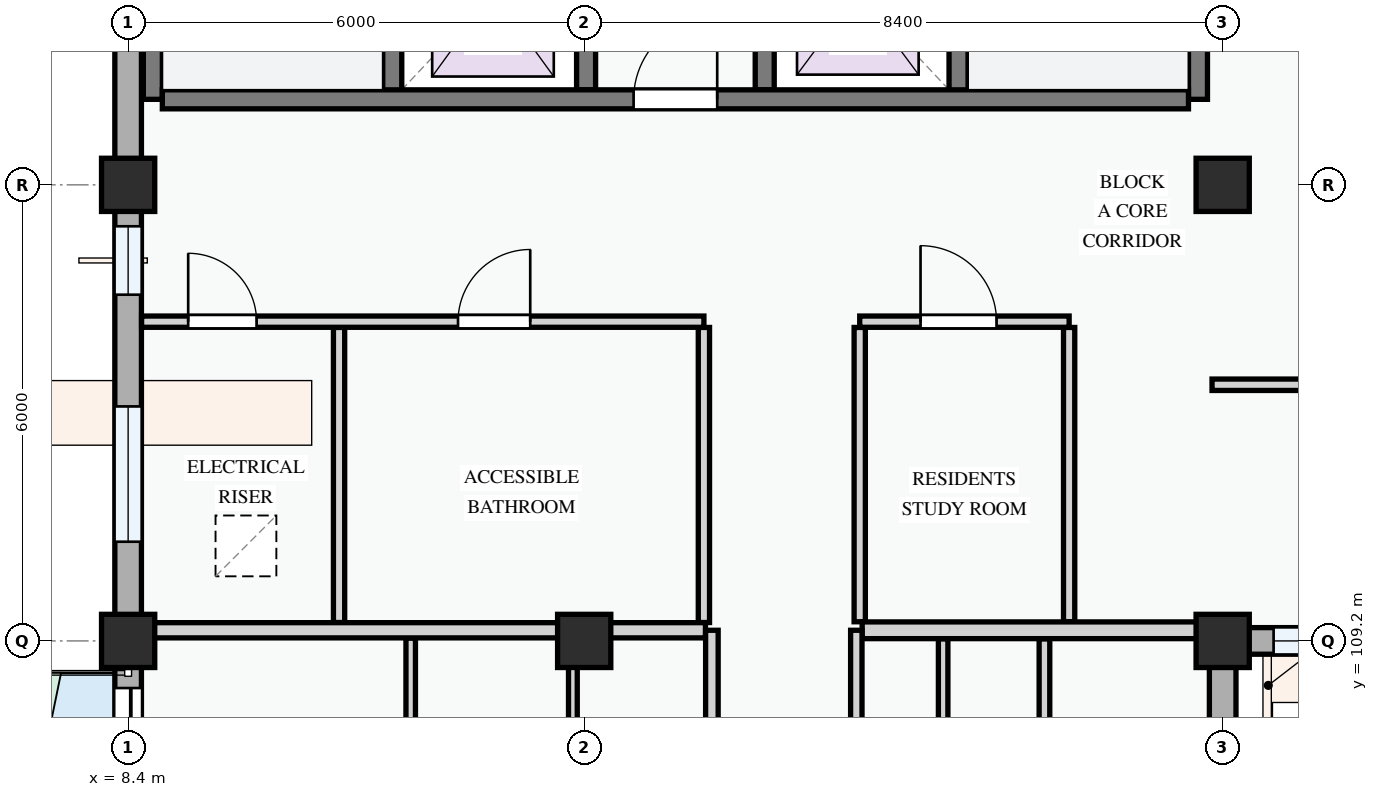
"""IFC4 building model, lengths in metres.
Left out: names, types, materials, properties, quantities, classifications, styles, units other than length and angle.
Written with IfcOpenShell. Run it as: python <this file> out.ifc"""

import sys

from ifc_helpers import new_model, si_unit, direction, frame, frame_2d, origin, origin_2d, place, context, subcontext, project, spatial, rectangle, extrude, element, fill, save


model = new_model("IFC4")
c1 = context("Model", 3, precision=1e-05, world=origin(), true_north=direction((0.0, 1.0)))
c2 = subcontext(c1, "Body", "Model", "MODEL_VIEW")
j1 = project(units=[si_unit("LENGTHUNIT", "METRE"), si_unit("PLANEANGLEUNIT", "RADIAN")], contexts=[c1])
p1 = place(None, origin())
s1 = spatial("IfcSite", under=j1, at=p1, CompositionType="ELEMENT")
p2 = place(p1, origin())
s2 = spatial("IfcBuilding", under=s1, at=p2, CompositionType="ELEMENT")
p3 = place(p2, frame((0.0, 0.0, 14.7)))
s3 = spatial("IfcBuildingStorey", under=s2, at=p3, CompositionType="ELEMENT", Elevation=14.7)
for number, where, z_axis, x_axis in (
    (1, (8.4, 109.2, 0.0), (0.0, 0.0, 1.0), (1.0, 0.0, 0.0)),
    (2, (8.4, 115.2, 0.0), (0.0, 0.0, 1.0), (1.0, 0.0, 0.0)),
    (3, (14.4, 109.2, 0.0), (0.0, 0.0, 1.0), (1.0, 0.0, 0.0)),
    (4, (22.8, 109.2, 0.0), (0.0, 0.0, 1.0), (1.0, 0.0, 0.0)),
    (5, (22.8, 115.2, 0.0), (0.0, 0.0, 1.0), (1.0, 0.0, 0.0)),
):
    element("IfcColumn", number, at=place(p3, frame(where, z_axis=z_axis, x_axis=x_axis)), inside=s3, PredefinedType="COLUMN", context=c2, shape_type="SweptSolid", body=[
        extrude(rectangle(XDim=0.7, YDim=0.7, at=origin_2d()), origin(), (0.0, 0.0, 1.0), 3.3),
    ])
p4 = place(p3, frame((22.8, 109.2, 0.0), z_axis=(0.0, 0.0, 1.0), x_axis=(1.0, 0.0, 0.0)))
e6 = element("IfcWall", 6, at=p4, inside=s3, PredefinedType="STANDARD", context=c2, shape_type="SweptSolid", body=[
    extrude(rectangle(XDim=6.0, YDim=0.35, at=frame_2d((3.0, 0.0))), origin(), (0.0, 0.0, 1.0), 2.475),
])
p5 = place(p4, frame((0.67, 0.0, 0.78)))
e7 = element("IfcOpeningElement", 7, at=p5, cuts=e6, PredefinedType="OPENING", context=c2, shape_type="SweptSolid", body=[
    extrude(rectangle(XDim=1.2, YDim=1.35, at=frame_2d((0.6, 0.675))), frame((0.0, 0.185, 0.0), z_axis=(0.0, -1.0, 0.0), x_axis=(1.0, 0.0, 0.0)), (0.0, 0.0, 1.0), 0.37),
])
p6 = place(p4, frame((2.905, 0.0, 0.78)))
e8 = element("IfcOpeningElement", 8, at=p6, cuts=e6, PredefinedType="OPENING", context=c2, shape_type="SweptSolid", body=[
    extrude(rectangle(XDim=2.35, YDim=1.55, at=frame_2d((1.175, 0.775))), frame((0.0, 0.185, 0.0), z_axis=(0.0, -1.0, 0.0), x_axis=(1.0, 0.0, 0.0)), (0.0, 0.0, 1.0), 0.37),
])
p7 = place(p3, frame((8.4, 123.6, 0.0), z_axis=(0.0, 0.0, 1.0), x_axis=(0.0, -1.0, 0.0)))
e9 = element("IfcWall", 9, at=p7, inside=s3, PredefinedType="STANDARD", context=c2, shape_type="SweptSolid", body=[
    extrude(rectangle(XDim=8.4, YDim=0.35, at=frame_2d((4.2, 0.0))), origin(), (0.0, 0.0, 1.0), 2.345),
])
p8 = place(p7, frame((1.446, 0.0, 0.78)))
e10 = element("IfcOpeningElement", 10, at=p8, cuts=e9, PredefinedType="OPENING", context=c2, shape_type="SweptSolid", body=[
    extrude(rectangle(XDim=1.1, YDim=1.3, at=frame_2d((0.55, 0.65))), frame((0.0, 0.185, 0.0), z_axis=(0.0, -1.0, 0.0), x_axis=(1.0, 0.0, 0.0)), (0.0, 0.0, 1.0), 0.37),
])
p9 = place(p7, frame((4.944, 0.0, 0.78)))
e11 = element("IfcOpeningElement", 11, at=p9, cuts=e9, PredefinedType="OPENING", context=c2, shape_type="SweptSolid", body=[
    extrude(rectangle(XDim=1.05, YDim=1.2, at=frame_2d((0.525, 0.6))), frame((0.0, 0.185, 0.0), z_axis=(0.0, -1.0, 0.0), x_axis=(1.0, 0.0, 0.0)), (0.0, 0.0, 1.0), 0.37),
])
p10 = place(p3, frame((8.4, 115.2, 0.0), z_axis=(0.0, 0.0, 1.0), x_axis=(0.0, -1.0, 0.0)))
e12 = element("IfcWall", 12, at=p10, inside=s3, PredefinedType="STANDARD", context=c2, shape_type="SweptSolid", body=[
    extrude(rectangle(XDim=6.0, YDim=0.35, at=frame_2d((3.0, 0.0))), origin(), (0.0, 0.0, 1.0), 2.445),
])
p11 = place(p10, frame((0.545, 0.0, 0.78)))
e13 = element("IfcOpeningElement", 13, at=p11, cuts=e12, PredefinedType="OPENING", context=c2, shape_type="SweptSolid", body=[
    extrude(rectangle(XDim=0.9, YDim=1.2, at=frame_2d((0.45, 0.6))), frame((0.0, 0.185, 0.0), z_axis=(0.0, -1.0, 0.0), x_axis=(1.0, 0.0, 0.0)), (0.0, 0.0, 1.0), 0.37),
])
p12 = place(p10, frame((2.915, 0.0, 0.78)))
e14 = element("IfcOpeningElement", 14, at=p12, cuts=e12, PredefinedType="OPENING", context=c2, shape_type="SweptSolid", body=[
    extrude(rectangle(XDim=1.78, YDim=1.42, at=frame_2d((0.89, 0.71))), frame((0.0, 0.185, 0.0), z_axis=(0.0, -1.0, 0.0), x_axis=(1.0, 0.0, 0.0)), (0.0, 0.0, 1.0), 0.37),
])
p13 = place(p3, frame((8.4, 109.2, 0.0), z_axis=(0.0, 0.0, 1.0), x_axis=(0.0, -1.0, 0.0)))
e15 = element("IfcWall", 15, at=p13, inside=s3, PredefinedType="STANDARD", context=c2, shape_type="SweptSolid", body=[
    extrude(rectangle(XDim=8.4, YDim=0.35, at=frame_2d((4.2, 0.0))), origin(), (0.0, 0.0, 1.0), 2.345),
])
p14 = place(p13, frame((0.62, 0.0, 0.0)))
e16 = element("IfcOpeningElement", 16, at=p14, cuts=e15, PredefinedType="OPENING", context=c2, shape_type="SweptSolid", body=[
    extrude(rectangle(XDim=1.5, YDim=2.2, at=frame_2d((0.75, 1.1))), frame((0.0, 0.185, 0.0), z_axis=(0.0, -1.0, 0.0), x_axis=(1.0, 0.0, 0.0)), (0.0, 0.0, 1.0), 0.37),
])
p15 = place(p13, frame((3.57, 0.0, 0.78)))
e17 = element("IfcOpeningElement", 17, at=p15, cuts=e15, PredefinedType="OPENING", context=c2, shape_type="SweptSolid", body=[
    extrude(rectangle(XDim=1.25, YDim=1.3, at=frame_2d((0.625, 0.65))), frame((0.0, 0.185, 0.0), z_axis=(0.0, -1.0, 0.0), x_axis=(1.0, 0.0, 0.0)), (0.0, 0.0, 1.0), 0.37),
])
p16 = place(p13, frame((6.665, 0.0, 0.78)))
e18 = element("IfcOpeningElement", 18, at=p16, cuts=e15, PredefinedType="OPENING", context=c2, shape_type="SweptSolid", body=[
    extrude(rectangle(XDim=1.1, YDim=1.3, at=frame_2d((0.55, 0.65))), frame((0.0, 0.185, 0.0), z_axis=(0.0, -1.0, 0.0), x_axis=(1.0, 0.0, 0.0)), (0.0, 0.0, 1.0), 0.37),
])
p17 = place(p3, frame((22.8, 100.8, 0.0), z_axis=(0.0, 0.0, 1.0), x_axis=(0.0, 1.0, 0.0)))
e19 = element("IfcWall", 19, at=p17, inside=s3, PredefinedType="STANDARD", context=c2, shape_type="SweptSolid", body=[
    extrude(rectangle(XDim=8.4, YDim=0.35, at=frame_2d((4.2, 0.0))), origin(), (0.0, 0.0, 1.0), 2.425),
])
p18 = place(p17, frame((0.508, 0.0, 0.78)))
e20 = element("IfcOpeningElement", 20, at=p18, cuts=e19, PredefinedType="OPENING", context=c2, shape_type="SweptSolid", body=[
    extrude(rectangle(XDim=1.1, YDim=1.3, at=frame_2d((0.55, 0.65))), frame((0.0, 0.185, 0.0), z_axis=(0.0, -1.0, 0.0), x_axis=(1.0, 0.0, 0.0)), (0.0, 0.0, 1.0), 0.37),
])
p19 = place(p17, frame((2.657, 0.0, 0.78)))
e21 = element("IfcOpeningElement", 21, at=p19, cuts=e19, PredefinedType="OPENING", context=c2, shape_type="SweptSolid", body=[
    extrude(rectangle(XDim=1.75, YDim=1.45, at=frame_2d((0.875, 0.725))), frame((0.0, 0.185, 0.0), z_axis=(0.0, -1.0, 0.0), x_axis=(1.0, 0.0, 0.0)), (0.0, 0.0, 1.0), 0.37),
])
p20 = place(p17, frame((5.979, 0.0, 0.78)))
e22 = element("IfcOpeningElement", 22, at=p20, cuts=e19, PredefinedType="OPENING", context=c2, shape_type="SweptSolid", body=[
    extrude(rectangle(XDim=1.25, YDim=1.3, at=frame_2d((0.625, 0.65))), frame((0.0, 0.185, 0.0), z_axis=(0.0, -1.0, 0.0), x_axis=(1.0, 0.0, 0.0)), (0.0, 0.0, 1.0), 0.37),
])
p21 = place(p3, frame((11.875, 123.25, 0.0), z_axis=(0.0, 0.0, 1.0), x_axis=(0.0, -1.0, 0.0)))
e23 = element("IfcWall", 23, at=p21, inside=s3, PredefinedType="SHEAR", context=c2, shape_type="SweptSolid", body=[
    extrude(rectangle(XDim=6.925, YDim=0.25, at=frame_2d((3.462, 0.0))), origin(), (0.0, 0.0, 1.0), 3.0),
])
p22 = place(p21, frame((0.35, 0.0, 0.0)))
e24 = element("IfcOpeningElement", 24, at=p22, cuts=e23, PredefinedType="OPENING", context=c2, shape_type="SweptSolid", body=[
    extrude(rectangle(XDim=0.95, YDim=2.1, at=frame_2d((0.475, 1.05))), frame((0.0, 0.135, 0.0), z_axis=(0.0, -1.0, 0.0), x_axis=(1.0, 0.0, 0.0)), (0.0, 0.0, 1.0), 0.27),
])
p23 = place(p3, frame((8.725, 123.4, 0.0), z_axis=(0.0, 0.0, 1.0), x_axis=(0.0, -1.0, 0.0)))
e25 = element("IfcWall", 25, at=p23, inside=s3, PredefinedType="SHEAR", context=c2, shape_type="SweptSolid", body=[
    extrude(rectangle(XDim=7.075, YDim=0.25, at=frame_2d((3.538, 0.0))), origin(), (0.0, 0.0, 1.0), 3.0),
])
p24 = place(p3, frame((22.475, 123.25, 0.0), z_axis=(0.0, 0.0, 1.0), x_axis=(0.0, -1.0, 0.0)))
e26 = element("IfcWall", 26, at=p24, inside=s3, PredefinedType="SHEAR", context=c2, shape_type="SweptSolid", body=[
    extrude(rectangle(XDim=6.925, YDim=0.25, at=frame_2d((3.462, 0.0))), origin(), (0.0, 0.0, 1.0), 3.0),
])
p25 = place(p3, frame((19.325, 123.25, 0.0), z_axis=(0.0, 0.0, 1.0), x_axis=(0.0, -1.0, 0.0)))
e27 = element("IfcWall", 27, at=p25, inside=s3, PredefinedType="SHEAR", context=c2, shape_type="SweptSolid", body=[
    extrude(rectangle(XDim=6.925, YDim=0.25, at=frame_2d((3.462, 0.0))), origin(), (0.0, 0.0, 1.0), 3.0),
])
p26 = place(p25, frame((0.35, 0.0, 0.0)))
e28 = element("IfcOpeningElement", 28, at=p26, cuts=e27, PredefinedType="OPENING", context=c2, shape_type="SweptSolid", body=[
    extrude(rectangle(XDim=0.95, YDim=2.1, at=frame_2d((0.475, 1.05))), frame((0.0, 0.135, 0.0), z_axis=(0.0, -1.0, 0.0), x_axis=(1.0, 0.0, 0.0)), (0.0, 0.0, 1.0), 0.27),
])
for number, where, z_axis, x_axis in (
    (29, (14.425, 118.875, 0.0), (0.0, 0.0, 1.0), (0.0, -1.0, 0.0)),
    (30, (16.775, 118.875, 0.0), (0.0, 0.0, 1.0), (0.0, -1.0, 0.0)),
):
    element("IfcWall", number, at=place(p3, frame(where, z_axis=z_axis, x_axis=x_axis)), inside=s3, PredefinedType="SHEAR", context=c2, shape_type="SweptSolid", body=[
        extrude(rectangle(XDim=2.425, YDim=0.25, at=frame_2d((1.212, 0.0))), origin(), (0.0, 0.0, 1.0), 3.0),
    ])
p27 = place(p3, frame((8.85, 116.325, 0.0), z_axis=(0.0, 0.0, 1.0), x_axis=(1.0, 0.0, 0.0)))
e31 = element("IfcWall", 31, at=p27, inside=s3, PredefinedType="SHEAR", context=c2, shape_type="SweptSolid", body=[
    extrude(rectangle(XDim=13.5, YDim=0.25, at=frame_2d((6.75, 0.0))), origin(), (0.0, 0.0, 1.0), 3.0),
])
p28 = place(p27, frame((6.2, 0.0, 0.0)))
e32 = element("IfcOpeningElement", 32, at=p28, cuts=e31, PredefinedType="OPENING", context=c2, shape_type="SweptSolid", body=[
    extrude(rectangle(XDim=1.1, YDim=2.15, at=frame_2d((0.55, 1.075))), frame((0.0, 0.135, 0.0), z_axis=(0.0, -1.0, 0.0), x_axis=(1.0, 0.0, 0.0)), (0.0, 0.0, 1.0), 0.27),
])
for number, where, z_axis, x_axis in (
    (33, (11.175, 113.324, 0.0), (0.0, 0.0, 1.0), (0.0, -1.0, 0.0)),
    (34, (15.975, 113.324, 0.0), (0.0, 0.0, 1.0), (0.0, -1.0, 0.0)),
):
    element("IfcWall", number, at=place(p3, frame(where, z_axis=z_axis, x_axis=x_axis)), inside=s3, PredefinedType="PARTITIONING", context=c2, shape_type="SweptSolid", body=[
        extrude(rectangle(XDim=3.882, YDim=0.148, at=frame_2d((1.941, 0.0))), origin(), (0.0, 0.0, 1.0), 3.0),
    ])
for number, where, z_axis, x_axis in (
    (35, (18.025, 113.324, 0.0), (0.0, 0.0, 1.0), (0.0, -1.0, 0.0)),
    (36, (20.78, 113.324, 0.0), (0.0, 0.0, 1.0), (0.0, -1.0, 0.0)),
):
    element("IfcWall", number, at=place(p3, frame(where, z_axis=z_axis, x_axis=x_axis)), inside=s3, PredefinedType="PARTITIONING", context=c2, shape_type="SweptSolid", body=[
        extrude(rectangle(XDim=3.872, YDim=0.148, at=frame_2d((1.936, 0.0))), origin(), (0.0, 0.0, 1.0), 3.0),
    ])
p29 = place(p3, frame((8.577, 113.4, 0.0), z_axis=(0.0, 0.0, 1.0), x_axis=(1.0, 0.0, 0.0)))
e37 = element("IfcWall", 37, at=p29, inside=s3, PredefinedType="PARTITIONING", context=c2, shape_type="SweptSolid", body=[
    extrude(rectangle(XDim=7.398, YDim=0.148, at=frame_2d((3.699, 0.0))), origin(), (0.0, 0.0, 1.0), 3.0),
])
p30 = place(p29, frame((0.613, 0.0, 0.0)))
e38 = element("IfcOpeningElement", 38, at=p30, cuts=e37, PredefinedType="OPENING", context=c2, shape_type="SweptSolid", body=[
    extrude(rectangle(XDim=0.9, YDim=2.1, at=frame_2d((0.45, 1.05))), frame((0.0, 0.084, 0.0), z_axis=(0.0, -1.0, 0.0), x_axis=(1.0, 0.0, 0.0)), (0.0, 0.0, 1.0), 0.168),
])
p31 = place(p29, frame((4.163, 0.0, 0.0)))
e39 = element("IfcOpeningElement", 39, at=p31, cuts=e37, PredefinedType="OPENING", context=c2, shape_type="SweptSolid", body=[
    extrude(rectangle(XDim=0.95, YDim=2.1, at=frame_2d((0.475, 1.05))), frame((0.0, 0.084, 0.0), z_axis=(0.0, -1.0, 0.0), x_axis=(1.0, 0.0, 0.0)), (0.0, 0.0, 1.0), 0.168),
])
p32 = place(p3, frame((18.025, 113.4, 0.0), z_axis=(0.0, 0.0, 1.0), x_axis=(1.0, 0.0, 0.0)))
e40 = element("IfcWall", 40, at=p32, inside=s3, PredefinedType="PARTITIONING", context=c2, shape_type="SweptSolid", body=[
    extrude(rectangle(XDim=2.755, YDim=0.148, at=frame_2d((1.377, 0.0))), origin(), (0.0, 0.0, 1.0), 3.0),
])
p33 = place(p32, frame((0.8, 0.0, 0.0)))
e41 = element("IfcOpeningElement", 41, at=p33, cuts=e40, PredefinedType="OPENING", context=c2, shape_type="SweptSolid", body=[
    extrude(rectangle(XDim=1.0, YDim=2.15, at=frame_2d((0.5, 1.075))), frame((0.0, 0.084, 0.0), z_axis=(0.0, -1.0, 0.0), x_axis=(1.0, 0.0, 0.0)), (0.0, 0.0, 1.0), 0.168),
])
p34 = place(p3, frame((22.66, 112.57, 0.0), z_axis=(0.0, 0.0, 1.0), x_axis=(1.0, 0.0, 0.0)))
e42 = element("IfcWall", 42, at=p34, inside=s3, PredefinedType="PARTITIONING", context=c2, shape_type="SweptSolid", body=[
    extrude(rectangle(XDim=2.406, YDim=0.15, at=frame_2d((1.203, 0.0))), origin(), (0.0, 0.0, 1.0), 3.0),
])
p35 = place(p3, frame((12.118, 103.052, 0.0), z_axis=(0.0, 0.0, 1.0), x_axis=(0.0, 1.0, 0.0)))
e43 = element("IfcWall", 43, at=p35, inside=s3, PredefinedType="PARTITIONING", context=c2, shape_type="SweptSolid", body=[
    extrude(rectangle(XDim=6.186, YDim=0.125, at=frame_2d((3.093, 0.0))), origin(), (0.0, 0.0, 1.0), 3.0),
])
p36 = place(p3, frame((14.251, 103.052, 0.0), z_axis=(0.0, 0.0, 1.0), x_axis=(0.0, 1.0, 0.0)))
e44 = element("IfcWall", 44, at=p36, inside=s3, PredefinedType="PARTITIONING", context=c2, shape_type="SweptSolid", body=[
    extrude(rectangle(XDim=6.186, YDim=0.115, at=frame_2d((3.093, 0.0))), origin(), (0.0, 0.0, 1.0), 2.425),
])
p37 = place(p3, frame((20.455, 102.778, 0.0), z_axis=(0.0, 0.0, 1.0), x_axis=(0.0, 1.0, 0.0)))
e45 = element("IfcWall", 45, at=p37, inside=s3, PredefinedType="PARTITIONING", context=c2, shape_type="SweptSolid", body=[
    extrude(rectangle(XDim=6.45, YDim=0.14, at=frame_2d((3.225, 0.0))), origin(), (0.0, 0.0, 1.0), 3.0),
])
p38 = place(p3, frame((19.122, 102.778, 0.0), z_axis=(0.0, 0.0, 1.0), x_axis=(0.0, 1.0, 0.0)))
e46 = element("IfcWall", 46, at=p38, inside=s3, PredefinedType="PARTITIONING", context=c2, shape_type="SweptSolid", body=[
    extrude(rectangle(XDim=6.45, YDim=0.125, at=frame_2d((3.225, 0.0))), origin(), (0.0, 0.0, 1.0), 3.0),
])
p39 = place(p3, frame((8.577, 109.34, 0.0), z_axis=(0.0, 0.0, 1.0), x_axis=(1.0, 0.0, 0.0)))
e47 = element("IfcWall", 47, at=p39, inside=s3, PredefinedType="PARTITIONING", context=c2, shape_type="SweptSolid", body=[
    extrude(rectangle(XDim=7.419, YDim=0.2, at=frame_2d((3.709, 0.0))), origin(), (0.0, 0.0, 1.0), 2.375),
])
p40 = place(p3, frame((18.057, 109.34, 0.0), z_axis=(0.0, 0.0, 1.0), x_axis=(1.0, 0.0, 0.0)))
e48 = element("IfcWall", 48, at=p40, inside=s3, PredefinedType="PARTITIONING", context=c2, shape_type="SweptSolid", body=[
    extrude(rectangle(XDim=4.683, YDim=0.22, at=frame_2d((2.342, 0.0))), origin(), (0.0, 0.0, 1.0), 2.375),
])
p41 = place(p3, frame((16.08, 72.177, 0.0), z_axis=(0.0, 0.0, 1.0), x_axis=(0.0, 1.0, 0.0)))
e49 = element("IfcWall", 49, at=p41, inside=s3, PredefinedType="PARTITIONING", context=c2, shape_type="SweptSolid", body=[
    extrude(rectangle(XDim=37.163, YDim=0.165, at=frame_2d((18.582, 0.0))), origin(), (0.0, 0.0, 1.0), 3.0),
])
p42 = place(p41, frame((3.489, 0.0, 0.0)))
e50 = element("IfcOpeningElement", 50, at=p42, cuts=e49, PredefinedType="OPENING", context=c2, shape_type="SweptSolid", body=[
    extrude(rectangle(XDim=0.92, YDim=2.1, at=frame_2d((0.46, 1.05))), frame((0.0, 0.093, 0.0), z_axis=(0.0, -1.0, 0.0), x_axis=(1.0, 0.0, 0.0)), (0.0, 0.0, 1.0), 0.185),
])
p43 = place(p41, frame((16.543, 0.0, 0.0)))
e51 = element("IfcOpeningElement", 51, at=p43, cuts=e49, PredefinedType="OPENING", context=c2, shape_type="SweptSolid", body=[
    extrude(rectangle(XDim=0.92, YDim=2.1, at=frame_2d((0.46, 1.05))), frame((0.0, 0.093, 0.0), z_axis=(0.0, -1.0, 0.0), x_axis=(1.0, 0.0, 0.0)), (0.0, 0.0, 1.0), 0.185),
])
p44 = place(p41, frame((25.152, 0.0, 0.0)))
e52 = element("IfcOpeningElement", 52, at=p44, cuts=e49, PredefinedType="OPENING", context=c2, shape_type="SweptSolid", body=[
    extrude(rectangle(XDim=0.92, YDim=2.1, at=frame_2d((0.46, 1.05))), frame((0.0, 0.093, 0.0), z_axis=(0.0, -1.0, 0.0), x_axis=(1.0, 0.0, 0.0)), (0.0, 0.0, 1.0), 0.185),
])
p45 = place(p3, frame((17.98, 72.177, 0.0), z_axis=(0.0, 0.0, 1.0), x_axis=(0.0, 1.0, 0.0)))
e53 = element("IfcWall", 53, at=p45, inside=s3, PredefinedType="PARTITIONING", context=c2, shape_type="SweptSolid", body=[
    extrude(rectangle(XDim=37.163, YDim=0.15, at=frame_2d((18.582, 0.0))), origin(), (0.0, 0.0, 1.0), 3.0),
])
p46 = place(p45, frame((3.551, 0.0, 0.0)))
e54 = element("IfcOpeningElement", 54, at=p46, cuts=e53, PredefinedType="OPENING", context=c2, shape_type="SweptSolid", body=[
    extrude(rectangle(XDim=0.92, YDim=2.1, at=frame_2d((0.46, 1.05))), frame((0.0, 0.085, 0.0), z_axis=(0.0, -1.0, 0.0), x_axis=(1.0, 0.0, 0.0)), (0.0, 0.0, 1.0), 0.17),
])
p47 = place(p45, frame((16.275, 0.0, 0.0)))
e55 = element("IfcOpeningElement", 55, at=p47, cuts=e53, PredefinedType="OPENING", context=c2, shape_type="SweptSolid", body=[
    extrude(rectangle(XDim=0.96, YDim=2.12, at=frame_2d((0.48, 1.06))), frame((0.0, 0.085, 0.0), z_axis=(0.0, -1.0, 0.0), x_axis=(1.0, 0.0, 0.0)), (0.0, 0.0, 1.0), 0.17),
])
p48 = place(p45, frame((25.128, 0.0, 0.0)))
e56 = element("IfcOpeningElement", 56, at=p48, cuts=e53, PredefinedType="OPENING", context=c2, shape_type="SweptSolid", body=[
    extrude(rectangle(XDim=0.92, YDim=2.1, at=frame_2d((0.46, 1.05))), frame((0.0, 0.085, 0.0), z_axis=(0.0, -1.0, 0.0), x_axis=(1.0, 0.0, 0.0)), (0.0, 0.0, 1.0), 0.17),
])
p49 = place(p5, origin())
e57 = element("IfcWindow", 57, at=p49, inside=s3, PartitioningType="SINGLE_PANEL", PredefinedType="WINDOW", context=c2, shape_type="SweptSolid", body=[
    extrude(rectangle(XDim=1.2, YDim=1.35, at=frame_2d((0.6, 0.675))), frame((0.0, 0.03, 0.0), z_axis=(0.0, -1.0, 0.0), x_axis=(1.0, 0.0, 0.0)), (0.0, 0.0, 1.0), 0.06),
])
fill(e7, e57)
p50 = place(p11, origin())
e58 = element("IfcWindow", 58, at=p50, inside=s3, PartitioningType="SINGLE_PANEL", PredefinedType="WINDOW", context=c2, shape_type="SweptSolid", body=[
    extrude(rectangle(XDim=0.9, YDim=1.2, at=frame_2d((0.45, 0.6))), frame((0.0, 0.03, 0.0), z_axis=(0.0, -1.0, 0.0), x_axis=(1.0, 0.0, 0.0)), (0.0, 0.0, 1.0), 0.06),
])
fill(e13, e58)
p51 = place(p12, origin())
e59 = element("IfcWindow", 59, at=p51, inside=s3, PartitioningType="DOUBLE_PANEL_VERTICAL", PredefinedType="WINDOW", context=c2, shape_type="SweptSolid", body=[
    extrude(rectangle(XDim=1.78, YDim=1.42, at=frame_2d((0.89, 0.71))), frame((0.0, 0.03, 0.0), z_axis=(0.0, -1.0, 0.0), x_axis=(1.0, 0.0, 0.0)), (0.0, 0.0, 1.0), 0.06),
])
fill(e14, e59)
p52 = place(p14, frame((1.5, 0.0, 0.0), z_axis=(0.0, 0.0, 1.0), x_axis=(-1.0, 0.0, 0.0)))
e60 = element("IfcDoor", 60, at=p52, inside=s3, OperationType="SLIDING_TO_RIGHT", PredefinedType="DOOR", context=c2, shape_type="SweptSolid", body=[
    extrude(rectangle(XDim=1.5, YDim=2.2, at=frame_2d((0.75, 1.1))), frame((0.0, 0.025, 0.0), z_axis=(0.0, -1.0, 0.0), x_axis=(1.0, 0.0, 0.0)), (0.0, 0.0, 1.0), 0.05),
])
fill(e16, e60)
p53 = place(p28, origin())
e61 = element("IfcDoor", 61, at=p53, inside=s3, OperationType="SINGLE_SWING_RIGHT", PredefinedType="DOOR", context=c2, shape_type="SweptSolid", body=[
    extrude(rectangle(XDim=1.1, YDim=2.15, at=frame_2d((0.55, 1.075))), frame((0.0, 0.025, 0.0), z_axis=(0.0, -1.0, 0.0), x_axis=(1.0, 0.0, 0.0)), (0.0, 0.0, 1.0), 0.05),
])
fill(e32, e61)
p54 = place(p30, origin())
e62 = element("IfcDoor", 62, at=p54, inside=s3, OperationType="SINGLE_SWING_LEFT", PredefinedType="DOOR", context=c2, shape_type="SweptSolid", body=[
    extrude(rectangle(XDim=0.9, YDim=2.1, at=frame_2d((0.45, 1.05))), frame((0.0, 0.025, 0.0), z_axis=(0.0, -1.0, 0.0), x_axis=(1.0, 0.0, 0.0)), (0.0, 0.0, 1.0), 0.05),
])
fill(e38, e62)
p55 = place(p31, origin())
e63 = element("IfcDoor", 63, at=p55, inside=s3, OperationType="SINGLE_SWING_RIGHT", PredefinedType="DOOR", context=c2, shape_type="SweptSolid", body=[
    extrude(rectangle(XDim=0.95, YDim=2.1, at=frame_2d((0.475, 1.05))), frame((0.0, 0.025, 0.0), z_axis=(0.0, -1.0, 0.0), x_axis=(1.0, 0.0, 0.0)), (0.0, 0.0, 1.0), 0.05),
])
fill(e39, e63)
p56 = place(p33, origin())
e64 = element("IfcDoor", 64, at=p56, inside=s3, OperationType="SINGLE_SWING_LEFT", PredefinedType="DOOR", context=c2, shape_type="SweptSolid", body=[
    extrude(rectangle(XDim=1.0, YDim=2.15, at=frame_2d((0.5, 1.075))), frame((0.0, 0.025, 0.0), z_axis=(0.0, -1.0, 0.0), x_axis=(1.0, 0.0, 0.0)), (0.0, 0.0, 1.0), 0.05),
])
fill(e41, e64)
save(model, sys.argv[1])
